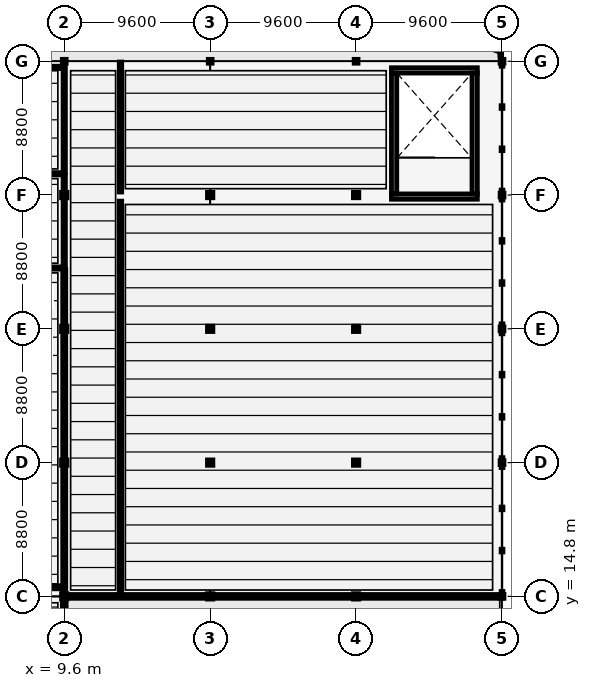
"""IFC4 building model, lengths in metres.
Left out: names, types, materials, properties, quantities, classifications, styles, units other than length and angle.
Written with IfcOpenShell. Run it as: python <this file> out.ifc"""

import sys

from ifc_helpers import new_model, si_unit, direction, frame, frame_2d, origin, origin_2d, place, context, subcontext, project, spatial, rectangle, hollow_rectangle, i_section, extrude, element, fill, save


model = new_model("IFC4")
c1 = context("Model", 3, precision=1e-05, world=origin(), true_north=direction((0.0, 1.0)))
c2 = subcontext(c1, "Body", "Model", "MODEL_VIEW")
j1 = project(units=[si_unit("LENGTHUNIT", "METRE"), si_unit("PLANEANGLEUNIT", "RADIAN")], contexts=[c1])
p1 = place(None, origin())
s1 = spatial("IfcSite", under=j1, at=p1, CompositionType="ELEMENT")
p2 = place(p1, origin())
s2 = spatial("IfcBuilding", under=s1, at=p2, CompositionType="ELEMENT")
p3 = place(p2, frame((0.0, 0.0, 9.6)))
s3 = spatial("IfcBuildingStorey", under=s2, at=p3, CompositionType="ELEMENT", Elevation=9.6)
p4 = place(p3, frame((9.6, 14.8, 0.0), z_axis=(0.0, 0.0, 1.0), x_axis=(1.0, 0.0, 0.0)))
e1 = element("IfcColumn", 1, at=p4, inside=s3, PredefinedType="COLUMN", context=c2, shape_type="SweptSolid", body=[
    extrude(i_section(OverallWidth=0.356, OverallDepth=0.356, WebThickness=0.011, FlangeThickness=0.018, FilletRadius=0.025, at=origin_2d()), origin(), (0.0, 0.0, 1.0), 5.629),
])
p5 = place(p3, frame((9.6, 23.6, 0.0), z_axis=(0.0, 0.0, 1.0), x_axis=(1.0, 0.0, 0.0)))
e2 = element("IfcColumn", 2, at=p5, inside=s3, PredefinedType="COLUMN", context=c2, shape_type="SweptSolid", body=[
    extrude(i_section(OverallWidth=0.356, OverallDepth=0.356, WebThickness=0.011, FlangeThickness=0.018, FilletRadius=0.025, at=origin_2d()), origin(), (0.0, 0.0, 1.0), 6.217),
])
p6 = place(p3, frame((9.6, 32.4, 0.0), z_axis=(0.0, 0.0, 1.0), x_axis=(1.0, 0.0, 0.0)))
e3 = element("IfcColumn", 3, at=p6, inside=s3, PredefinedType="COLUMN", context=c2, shape_type="SweptSolid", body=[
    extrude(i_section(OverallWidth=0.356, OverallDepth=0.356, WebThickness=0.011, FlangeThickness=0.018, FilletRadius=0.025, at=origin_2d()), origin(), (0.0, 0.0, 1.0), 6.224),
])
p7 = place(p3, frame((9.6, 41.2, 0.0), z_axis=(0.0, 0.0, 1.0), x_axis=(1.0, 0.0, 0.0)))
e4 = element("IfcColumn", 4, at=p7, inside=s3, PredefinedType="COLUMN", context=c2, shape_type="SweptSolid", body=[
    extrude(i_section(OverallWidth=0.356, OverallDepth=0.356, WebThickness=0.011, FlangeThickness=0.018, FilletRadius=0.025, at=origin_2d()), origin(), (0.0, 0.0, 1.0), 5.648),
])
p8 = place(p3, frame((9.6, 50.0, 0.0), z_axis=(0.0, 0.0, 1.0), x_axis=(1.0, 0.0, 0.0)))
e5 = element("IfcColumn", 5, at=p8, inside=s3, PredefinedType="COLUMN", context=c2, shape_type="SweptSolid", body=[
    extrude(hollow_rectangle(XDim=0.254, YDim=0.254, WallThickness=0.012, at=origin_2d()), origin(), (0.0, 0.0, 1.0), 4.648),
])
p9 = place(p3, frame((19.2, 14.8, 0.0), z_axis=(0.0, 0.0, 1.0), x_axis=(1.0, 0.0, 0.0)))
e6 = element("IfcColumn", 6, at=p9, inside=s3, PredefinedType="COLUMN", context=c2, shape_type="SweptSolid", body=[
    extrude(i_section(OverallWidth=0.356, OverallDepth=0.356, WebThickness=0.011, FlangeThickness=0.018, FilletRadius=0.025, at=origin_2d()), origin(), (0.0, 0.0, 1.0), 5.485),
])
p10 = place(p3, frame((19.2, 23.6, 0.0), z_axis=(0.0, 0.0, 1.0), x_axis=(1.0, 0.0, 0.0)))
e7 = element("IfcColumn", 7, at=p10, inside=s3, PredefinedType="COLUMN", context=c2, shape_type="SweptSolid", body=[
    extrude(i_section(OverallWidth=0.356, OverallDepth=0.356, WebThickness=0.011, FlangeThickness=0.018, FilletRadius=0.025, at=origin_2d()), origin(), (0.0, 0.0, 1.0), 6.22),
])
p11 = place(p3, frame((19.2, 32.4, 0.0), z_axis=(0.0, 0.0, 1.0), x_axis=(1.0, 0.0, 0.0)))
e8 = element("IfcColumn", 8, at=p11, inside=s3, PredefinedType="COLUMN", context=c2, shape_type="SweptSolid", body=[
    extrude(i_section(OverallWidth=0.356, OverallDepth=0.356, WebThickness=0.011, FlangeThickness=0.018, FilletRadius=0.025, at=origin_2d()), origin(), (0.0, 0.0, 1.0), 6.228),
])
p12 = place(p3, frame((19.2, 41.2, 0.0), z_axis=(0.0, 0.0, 1.0), x_axis=(1.0, 0.0, 0.0)))
e9 = element("IfcColumn", 9, at=p12, inside=s3, PredefinedType="COLUMN", context=c2, shape_type="SweptSolid", body=[
    extrude(i_section(OverallWidth=0.356, OverallDepth=0.356, WebThickness=0.011, FlangeThickness=0.018, FilletRadius=0.025, at=origin_2d()), origin(), (0.0, 0.0, 1.0), 5.509),
])
p13 = place(p3, frame((19.2, 50.0, 0.0), z_axis=(0.0, 0.0, 1.0), x_axis=(1.0, 0.0, 0.0)))
e10 = element("IfcColumn", 10, at=p13, inside=s3, PredefinedType="COLUMN", context=c2, shape_type="SweptSolid", body=[
    extrude(hollow_rectangle(XDim=0.254, YDim=0.254, WallThickness=0.012, at=origin_2d()), origin(), (0.0, 0.0, 1.0), 4.258),
])
p14 = place(p3, frame((28.8, 14.8, 0.0), z_axis=(0.0, 0.0, 1.0), x_axis=(1.0, 0.0, 0.0)))
e11 = element("IfcColumn", 11, at=p14, inside=s3, PredefinedType="COLUMN", context=c2, shape_type="SweptSolid", body=[
    extrude(i_section(OverallWidth=0.356, OverallDepth=0.356, WebThickness=0.011, FlangeThickness=0.018, FilletRadius=0.025, at=origin_2d()), origin(), (0.0, 0.0, 1.0), 4.573),
])
p15 = place(p3, frame((28.8, 23.6, 0.0), z_axis=(0.0, 0.0, 1.0), x_axis=(1.0, 0.0, 0.0)))
e12 = element("IfcColumn", 12, at=p15, inside=s3, PredefinedType="COLUMN", context=c2, shape_type="SweptSolid", body=[
    extrude(i_section(OverallWidth=0.356, OverallDepth=0.356, WebThickness=0.011, FlangeThickness=0.018, FilletRadius=0.025, at=origin_2d()), origin(), (0.0, 0.0, 1.0), 5.16),
])
p16 = place(p3, frame((28.8, 32.4, 0.0), z_axis=(0.0, 0.0, 1.0), x_axis=(1.0, 0.0, 0.0)))
e13 = element("IfcColumn", 13, at=p16, inside=s3, PredefinedType="COLUMN", context=c2, shape_type="SweptSolid", body=[
    extrude(i_section(OverallWidth=0.356, OverallDepth=0.356, WebThickness=0.011, FlangeThickness=0.018, FilletRadius=0.025, at=origin_2d()), origin(), (0.0, 0.0, 1.0), 5.167),
])
p17 = place(p3, frame((28.8, 41.2, 0.0), z_axis=(0.0, 0.0, 1.0), x_axis=(1.0, 0.0, 0.0)))
e14 = element("IfcColumn", 14, at=p17, inside=s3, PredefinedType="COLUMN", context=c2, shape_type="SweptSolid", body=[
    extrude(i_section(OverallWidth=0.356, OverallDepth=0.356, WebThickness=0.011, FlangeThickness=0.018, FilletRadius=0.025, at=origin_2d()), origin(), (0.0, 0.0, 1.0), 4.592),
])
p18 = place(p3, frame((28.8, 50.0, 0.0), z_axis=(0.0, 0.0, 1.0), x_axis=(1.0, 0.0, 0.0)))
e15 = element("IfcColumn", 15, at=p18, inside=s3, PredefinedType="COLUMN", context=c2, shape_type="SweptSolid", body=[
    extrude(hollow_rectangle(XDim=0.254, YDim=0.254, WallThickness=0.012, at=origin_2d()), origin(), (0.0, 0.0, 1.0), 3.592),
])
p19 = place(p3, frame((38.4, 14.8, 0.0), z_axis=(0.0, 0.0, 1.0), x_axis=(1.0, 0.0, 0.0)))
e16 = element("IfcColumn", 16, at=p19, inside=s3, PredefinedType="COLUMN", context=c2, shape_type="SweptSolid", body=[
    extrude(hollow_rectangle(XDim=0.254, YDim=0.254, WallThickness=0.012, at=origin_2d()), origin(), (0.0, 0.0, 1.0), 3.809),
])
p20 = place(p3, frame((38.4, 23.6, 0.0), z_axis=(0.0, 0.0, 1.0), x_axis=(1.0, 0.0, 0.0)))
e17 = element("IfcColumn", 17, at=p20, inside=s3, PredefinedType="COLUMN", context=c2, shape_type="SweptSolid", body=[
    extrude(hollow_rectangle(XDim=0.254, YDim=0.254, WallThickness=0.012, at=origin_2d()), origin(), (0.0, 0.0, 1.0), 4.013),
])
p21 = place(p3, frame((38.4, 32.4, 0.0), z_axis=(0.0, 0.0, 1.0), x_axis=(1.0, 0.0, 0.0)))
e18 = element("IfcColumn", 18, at=p21, inside=s3, PredefinedType="COLUMN", context=c2, shape_type="SweptSolid", body=[
    extrude(hollow_rectangle(XDim=0.254, YDim=0.254, WallThickness=0.012, at=origin_2d()), origin(), (0.0, 0.0, 1.0), 4.016),
])
p22 = place(p3, frame((38.4, 41.2, 0.0), z_axis=(0.0, 0.0, 1.0), x_axis=(1.0, 0.0, 0.0)))
e19 = element("IfcColumn", 19, at=p22, inside=s3, PredefinedType="COLUMN", context=c2, shape_type="SweptSolid", body=[
    extrude(hollow_rectangle(XDim=0.254, YDim=0.254, WallThickness=0.012, at=origin_2d()), origin(), (0.0, 0.0, 1.0), 3.815),
])
p23 = place(p3, frame((38.4, 50.0, 0.0), z_axis=(0.0, 0.0, 1.0), x_axis=(1.0, 0.0, 0.0)))
e20 = element("IfcColumn", 20, at=p23, inside=s3, PredefinedType="COLUMN", context=c2, shape_type="SweptSolid", body=[
    extrude(hollow_rectangle(XDim=0.254, YDim=0.254, WallThickness=0.012, at=origin_2d()), origin(), (0.0, 0.0, 1.0), 3.467),
])
p24 = place(p3, frame((9.6, 14.8, 0.0), z_axis=(0.0, 0.0, 1.0), x_axis=(1.0, 0.0, 0.0)))
e21 = element("IfcWall", 21, at=p24, inside=s3, PredefinedType="STANDARD", context=c2, shape_type="SweptSolid", body=[
    extrude(rectangle(XDim=9.6, YDim=0.25, at=frame_2d((4.8, 0.0))), origin(), (0.0, 0.0, 1.0), 3.5),
])
p25 = place(p24, frame((3.6, 0.0, 0.0)))
e22 = element("IfcOpeningElement", 22, at=p25, cuts=e21, PredefinedType="OPENING", context=c2, shape_type="SweptSolid", body=[
    extrude(rectangle(XDim=1.48, YDim=2.11, at=frame_2d((0.74, 1.055))), frame((0.0, 0.135, 0.0), z_axis=(0.0, -1.0, 0.0), x_axis=(1.0, 0.0, 0.0)), (0.0, 0.0, 1.0), 0.27),
])
p26 = place(p24, frame((1.1, 0.0, 0.85)))
e23 = element("IfcOpeningElement", 23, at=p26, cuts=e21, PredefinedType="OPENING", context=c2, shape_type="SweptSolid", body=[
    extrude(rectangle(XDim=1.68, YDim=1.71, at=frame_2d((0.84, 0.855))), frame((0.0, 0.135, 0.0), z_axis=(0.0, -1.0, 0.0), x_axis=(1.0, 0.0, 0.0)), (0.0, 0.0, 1.0), 0.27),
])
p27 = place(p3, frame((19.2, 14.8, 0.0), z_axis=(0.0, 0.0, 1.0), x_axis=(1.0, 0.0, 0.0)))
e24 = element("IfcWall", 24, at=p27, inside=s3, PredefinedType="STANDARD", context=c2, shape_type="SweptSolid", body=[
    extrude(rectangle(XDim=9.6, YDim=0.25, at=frame_2d((4.8, 0.0))), origin(), (0.0, 0.0, 1.0), 3.5),
])
p28 = place(p27, frame((3.6, 0.0, 0.0)))
e25 = element("IfcOpeningElement", 25, at=p28, cuts=e24, PredefinedType="OPENING", context=c2, shape_type="SweptSolid", body=[
    extrude(rectangle(XDim=1.6, YDim=2.2, at=frame_2d((0.8, 1.1))), frame((0.0, 0.135, 0.0), z_axis=(0.0, -1.0, 0.0), x_axis=(1.0, 0.0, 0.0)), (0.0, 0.0, 1.0), 0.27),
])
p29 = place(p27, frame((1.1, 0.0, 0.85)))
e26 = element("IfcOpeningElement", 26, at=p29, cuts=e24, PredefinedType="OPENING", context=c2, shape_type="SweptSolid", body=[
    extrude(rectangle(XDim=1.76, YDim=1.77, at=frame_2d((0.88, 0.885))), frame((0.0, 0.135, 0.0), z_axis=(0.0, -1.0, 0.0), x_axis=(1.0, 0.0, 0.0)), (0.0, 0.0, 1.0), 0.27),
])
p30 = place(p3, frame((28.8, 14.8, 0.0), z_axis=(0.0, 0.0, 1.0), x_axis=(1.0, 0.0, 0.0)))
e27 = element("IfcWall", 27, at=p30, inside=s3, PredefinedType="STANDARD", context=c2, shape_type="SweptSolid", body=[
    extrude(rectangle(XDim=9.6, YDim=0.25, at=frame_2d((4.8, 0.0))), origin(), (0.0, 0.0, 1.0), 3.5),
])
p31 = place(p30, frame((3.6, 0.0, 0.0)))
e28 = element("IfcOpeningElement", 28, at=p31, cuts=e27, PredefinedType="OPENING", context=c2, shape_type="SweptSolid", body=[
    extrude(rectangle(XDim=1.48, YDim=2.11, at=frame_2d((0.74, 1.055))), frame((0.0, 0.135, 0.0), z_axis=(0.0, -1.0, 0.0), x_axis=(1.0, 0.0, 0.0)), (0.0, 0.0, 1.0), 0.27),
])
p32 = place(p30, frame((1.1, 0.0, 0.85)))
e29 = element("IfcOpeningElement", 29, at=p32, cuts=e27, PredefinedType="OPENING", context=c2, shape_type="SweptSolid", body=[
    extrude(rectangle(XDim=1.72, YDim=1.74, at=frame_2d((0.86, 0.87))), frame((0.0, 0.135, 0.0), z_axis=(0.0, -1.0, 0.0), x_axis=(1.0, 0.0, 0.0)), (0.0, 0.0, 1.0), 0.27),
])
p33 = place(p3, frame((9.6, 6.127, 0.0), z_axis=(0.0, 0.0, 1.0), x_axis=(0.0, 1.0, 0.0)))
e30 = element("IfcWall", 30, at=p33, inside=s3, PredefinedType="STANDARD", context=c2, shape_type="SweptSolid", body=[
    extrude(rectangle(XDim=8.495, YDim=0.25, at=frame_2d((4.248, 0.0))), origin(), (0.0, 0.0, 1.0), 3.5),
])
p34 = place(p33, frame((3.4, 0.0, 0.0)))
e31 = element("IfcOpeningElement", 31, at=p34, cuts=e30, PredefinedType="OPENING", context=c2, shape_type="SweptSolid", body=[
    extrude(rectangle(XDim=1.0, YDim=2.2, at=frame_2d((0.5, 1.1))), frame((0.0, 0.135, 0.0), z_axis=(0.0, -1.0, 0.0), x_axis=(1.0, 0.0, 0.0)), (0.0, 0.0, 1.0), 0.27),
])
for number, where, z_axis, x_axis in (
    (32, (36.775, 41.1, 0.0), (0.0, 0.0, 1.0), (-1.0, 0.0, 0.0)),
    (33, (31.125, 49.4, 0.0), (0.0, 0.0, 1.0), (1.0, 0.0, 0.0)),
):
    element("IfcWall", number, at=place(p3, frame(where, z_axis=z_axis, x_axis=x_axis)), inside=s3, PredefinedType="SHEAR", context=c2, shape_type="SweptSolid", body=[
        extrude(rectangle(XDim=5.65, YDim=0.35, at=frame_2d((2.825, 0.0))), origin(), (0.0, 0.0, 1.0), 3.85),
    ])
p35 = place(p3, frame((31.3, 41.275, 0.0), z_axis=(0.0, 0.0, 1.0), x_axis=(0.0, 1.0, 0.0)))
e34 = element("IfcWall", 34, at=p35, inside=s3, PredefinedType="SHEAR", context=c2, shape_type="SweptSolid", body=[
    extrude(rectangle(XDim=7.95, YDim=0.35, at=frame_2d((3.975, 0.0))), origin(), (0.0, 0.0, 1.0), 3.85),
])
p36 = place(p35, frame((0.22, 0.0, 0.0)))
e35 = element("IfcOpeningElement", 35, at=p36, cuts=e34, PredefinedType="OPENING", context=c2, shape_type="SweptSolid", body=[
    extrude(rectangle(XDim=2.05, YDim=2.15, at=frame_2d((1.025, 1.075))), frame((0.0, 0.185, 0.0), z_axis=(0.0, -1.0, 0.0), x_axis=(1.0, 0.0, 0.0)), (0.0, 0.0, 1.0), 0.37),
])
p37 = place(p3, frame((36.6, 49.225, 0.0), z_axis=(0.0, 0.0, 1.0), x_axis=(0.0, -1.0, 0.0)))
e36 = element("IfcWall", 36, at=p37, inside=s3, PredefinedType="SHEAR", context=c2, shape_type="SweptSolid", body=[
    extrude(rectangle(XDim=7.95, YDim=0.35, at=frame_2d((3.975, 0.0))), origin(), (0.0, 0.0, 1.0), 3.85),
])
p38 = place(p3, frame((13.3, 14.85, 0.0), z_axis=(0.0, 0.0, 1.0), x_axis=(0.0, 1.0, 0.0)))
e37 = element("IfcWall", 37, at=p38, inside=s3, PredefinedType="PARTITIONING", context=c2, shape_type="SweptSolid", body=[
    extrude(rectangle(XDim=25.95, YDim=0.16, at=frame_2d((12.975, 0.0))), origin(), (0.0, 0.0, 1.0), 3.4),
])
p39 = place(p38, frame((12.075, 0.0, 0.0)))
e38 = element("IfcOpeningElement", 38, at=p39, cuts=e37, PredefinedType="OPENING", context=c2, shape_type="SweptSolid", body=[
    extrude(rectangle(XDim=1.8, YDim=2.15, at=frame_2d((0.9, 1.075))), frame((0.0, 0.09, 0.0), z_axis=(0.0, -1.0, 0.0), x_axis=(1.0, 0.0, 0.0)), (0.0, 0.0, 1.0), 0.18),
])
p40 = place(p3, frame((13.3, 41.4, 0.0), z_axis=(0.0, 0.0, 1.0), x_axis=(0.0, 1.0, 0.0)))
e39 = element("IfcWall", 39, at=p40, inside=s3, PredefinedType="PARTITIONING", context=c2, shape_type="SweptSolid", body=[
    extrude(rectangle(XDim=8.55, YDim=0.16, at=frame_2d((4.275, 0.0))), origin(), (0.0, 0.0, 1.0), 3.4),
])
p41 = place(p40, frame((3.375, 0.0, 0.0)))
e40 = element("IfcOpeningElement", 40, at=p41, cuts=e39, PredefinedType="OPENING", context=c2, shape_type="SweptSolid", body=[
    extrude(rectangle(XDim=1.8, YDim=2.15, at=frame_2d((0.9, 1.075))), frame((0.0, 0.09, 0.0), z_axis=(0.0, -1.0, 0.0), x_axis=(1.0, 0.0, 0.0)), (0.0, 0.0, 1.0), 0.18),
])
p42 = place(p3, frame((9.6, 14.85, 0.0), z_axis=(0.0, 0.0, 1.0), x_axis=(0.0, 1.0, 0.0)))
e41 = element("IfcWall", 41, at=p42, inside=s3, PredefinedType="PARTITIONING", context=c2, shape_type="SweptSolid", body=[
    extrude(rectangle(XDim=21.45, YDim=0.2, at=frame_2d((10.725, 0.0))), origin(), (0.0, 0.0, 1.0), 3.4),
])
p43 = place(p42, frame((9.925, 0.0, 0.0)))
e42 = element("IfcOpeningElement", 42, at=p43, cuts=e41, PredefinedType="OPENING", context=c2, shape_type="SweptSolid", body=[
    extrude(rectangle(XDim=1.6, YDim=2.15, at=frame_2d((0.8, 1.075))), frame((0.0, 0.11, 0.0), z_axis=(0.0, -1.0, 0.0), x_axis=(1.0, 0.0, 0.0)), (0.0, 0.0, 1.0), 0.22),
])
p44 = place(p3, frame((9.6, 36.5, 0.0), z_axis=(0.0, 0.0, 1.0), x_axis=(0.0, 1.0, 0.0)))
e43 = element("IfcWall", 43, at=p44, inside=s3, PredefinedType="PARTITIONING", context=c2, shape_type="SweptSolid", body=[
    extrude(rectangle(XDim=6.0, YDim=0.15, at=frame_2d((3.0, 0.0))), origin(), (0.0, 0.0, 1.0), 3.4),
])
p45 = place(p44, frame((2.55, 0.0, 0.0)))
e44 = element("IfcOpeningElement", 44, at=p45, cuts=e43, PredefinedType="OPENING", context=c2, shape_type="SweptSolid", body=[
    extrude(rectangle(XDim=0.9, YDim=2.15, at=frame_2d((0.45, 1.075))), frame((0.0, 0.085, 0.0), z_axis=(0.0, -1.0, 0.0), x_axis=(1.0, 0.0, 0.0)), (0.0, 0.0, 1.0), 0.17),
])
p46 = place(p3, frame((9.6, 42.7, 0.0), z_axis=(0.0, 0.0, 1.0), x_axis=(0.0, 1.0, 0.0)))
e45 = element("IfcWall", 45, at=p46, inside=s3, PredefinedType="PARTITIONING", context=c2, shape_type="SweptSolid", body=[
    extrude(rectangle(XDim=7.25, YDim=0.15, at=frame_2d((3.625, 0.0))), origin(), (0.0, 0.0, 1.0), 3.4),
])
p47 = place(p46, frame((3.15, 0.0, 0.0)))
e46 = element("IfcOpeningElement", 46, at=p47, cuts=e45, PredefinedType="OPENING", context=c2, shape_type="SweptSolid", body=[
    extrude(rectangle(XDim=0.95, YDim=2.15, at=frame_2d((0.475, 1.075))), frame((0.0, 0.085, 0.0), z_axis=(0.0, -1.0, 0.0), x_axis=(1.0, 0.0, 0.0)), (0.0, 0.0, 1.0), 0.17),
])
p48 = place(p3, frame((5.0, 36.4, 0.0), z_axis=(0.0, 0.0, 1.0), x_axis=(1.0, 0.0, 0.0)))
e47 = element("IfcWall", 47, at=p48, inside=s3, PredefinedType="PARTITIONING", context=c2, shape_type="SweptSolid", body=[
    extrude(rectangle(XDim=4.4, YDim=0.15, at=frame_2d((2.2, 0.0))), origin(), (0.0, 0.0, 1.0), 3.4),
])
p49 = place(p3, frame((5.8, 42.6, 0.0), z_axis=(0.0, 0.0, 1.0), x_axis=(1.0, 0.0, 0.0)))
e48 = element("IfcWall", 48, at=p49, inside=s3, PredefinedType="PARTITIONING", context=c2, shape_type="SweptSolid", body=[
    extrude(rectangle(XDim=3.6, YDim=0.15, at=frame_2d((1.8, 0.0))), origin(), (0.0, 0.0, 1.0), 3.4),
])
p50 = place(p3, frame((0.05, 15.4, 0.0), z_axis=(0.0, 0.0, 1.0), x_axis=(1.0, 0.0, 0.0)))
e49 = element("IfcWall", 49, at=p50, inside=s3, PredefinedType="PARTITIONING", context=c2, shape_type="SweptSolid", body=[
    extrude(rectangle(XDim=9.21, YDim=0.2, at=frame_2d((4.605, 0.0))), origin(), (0.0, 0.0, 1.0), 3.4),
])
p51 = place(p3, frame((5.94, 49.6, 0.0), z_axis=(0.0, 0.0, 1.0), x_axis=(1.0, 0.0, 0.0)))
e50 = element("IfcWall", 50, at=p51, inside=s3, PredefinedType="PARTITIONING", context=c2, shape_type="SweptSolid", body=[
    extrude(rectangle(XDim=3.32, YDim=0.15, at=frame_2d((1.66, 0.0))), origin(), (0.0, 0.0, 1.0), 3.4),
])
p52 = place(p25, origin())
e51 = element("IfcDoor", 51, at=p52, inside=s3, OperationType="DOUBLE_DOOR_SINGLE_SWING", PredefinedType="DOOR", context=c2, shape_type="SweptSolid", body=[
    extrude(rectangle(XDim=1.48, YDim=2.11, at=frame_2d((0.74, 1.055))), frame((0.0, 0.025, 0.0), z_axis=(0.0, -1.0, 0.0), x_axis=(1.0, 0.0, 0.0)), (0.0, 0.0, 1.0), 0.05),
])
fill(e22, e51)
p53 = place(p26, origin())
e52 = element("IfcWindow", 52, at=p53, inside=s3, PartitioningType="SINGLE_PANEL", PredefinedType="WINDOW", context=c2, shape_type="SweptSolid", body=[
    extrude(rectangle(XDim=1.68, YDim=1.71, at=frame_2d((0.84, 0.855))), frame((0.0, 0.03, 0.0), z_axis=(0.0, -1.0, 0.0), x_axis=(1.0, 0.0, 0.0)), (0.0, 0.0, 1.0), 0.06),
])
fill(e23, e52)
p54 = place(p28, origin())
e53 = element("IfcDoor", 53, at=p54, inside=s3, OperationType="DOUBLE_DOOR_SINGLE_SWING", PredefinedType="DOOR", context=c2, shape_type="SweptSolid", body=[
    extrude(rectangle(XDim=1.6, YDim=2.2, at=frame_2d((0.8, 1.1))), frame((0.0, 0.025, 0.0), z_axis=(0.0, -1.0, 0.0), x_axis=(1.0, 0.0, 0.0)), (0.0, 0.0, 1.0), 0.05),
])
fill(e25, e53)
p55 = place(p29, origin())
e54 = element("IfcWindow", 54, at=p55, inside=s3, PartitioningType="SINGLE_PANEL", PredefinedType="WINDOW", context=c2, shape_type="SweptSolid", body=[
    extrude(rectangle(XDim=1.76, YDim=1.77, at=frame_2d((0.88, 0.885))), frame((0.0, 0.03, 0.0), z_axis=(0.0, -1.0, 0.0), x_axis=(1.0, 0.0, 0.0)), (0.0, 0.0, 1.0), 0.06),
])
fill(e26, e54)
p56 = place(p31, origin())
e55 = element("IfcDoor", 55, at=p56, inside=s3, OperationType="DOUBLE_DOOR_SINGLE_SWING", PredefinedType="DOOR", context=c2, shape_type="SweptSolid", body=[
    extrude(rectangle(XDim=1.48, YDim=2.11, at=frame_2d((0.74, 1.055))), frame((0.0, 0.025, 0.0), z_axis=(0.0, -1.0, 0.0), x_axis=(1.0, 0.0, 0.0)), (0.0, 0.0, 1.0), 0.05),
])
fill(e28, e55)
p57 = place(p32, origin())
e56 = element("IfcWindow", 56, at=p57, inside=s3, PartitioningType="SINGLE_PANEL", PredefinedType="WINDOW", context=c2, shape_type="SweptSolid", body=[
    extrude(rectangle(XDim=1.72, YDim=1.74, at=frame_2d((0.86, 0.87))), frame((0.0, 0.03, 0.0), z_axis=(0.0, -1.0, 0.0), x_axis=(1.0, 0.0, 0.0)), (0.0, 0.0, 1.0), 0.06),
])
fill(e29, e56)
p58 = place(p36, origin())
e57 = element("IfcDoor", 57, at=p58, inside=s3, OperationType="DOUBLE_DOOR_SINGLE_SWING", PredefinedType="DOOR", context=c2, shape_type="SweptSolid", body=[
    extrude(rectangle(XDim=2.05, YDim=2.15, at=frame_2d((1.025, 1.075))), frame((0.0, 0.025, 0.0), z_axis=(0.0, -1.0, 0.0), x_axis=(1.0, 0.0, 0.0)), (0.0, 0.0, 1.0), 0.05),
])
fill(e35, e57)
p59 = place(p39, origin())
e58 = element("IfcDoor", 58, at=p59, inside=s3, OperationType="DOUBLE_DOOR_SINGLE_SWING", PredefinedType="DOOR", context=c2, shape_type="SweptSolid", body=[
    extrude(rectangle(XDim=1.8, YDim=2.15, at=frame_2d((0.9, 1.075))), frame((0.0, 0.025, 0.0), z_axis=(0.0, -1.0, 0.0), x_axis=(1.0, 0.0, 0.0)), (0.0, 0.0, 1.0), 0.05),
])
fill(e38, e58)
p60 = place(p41, origin())
e59 = element("IfcDoor", 59, at=p60, inside=s3, OperationType="DOUBLE_DOOR_SINGLE_SWING", PredefinedType="DOOR", context=c2, shape_type="SweptSolid", body=[
    extrude(rectangle(XDim=1.8, YDim=2.15, at=frame_2d((0.9, 1.075))), frame((0.0, 0.025, 0.0), z_axis=(0.0, -1.0, 0.0), x_axis=(1.0, 0.0, 0.0)), (0.0, 0.0, 1.0), 0.05),
])
fill(e40, e59)
p61 = place(p43, origin())
e60 = element("IfcDoor", 60, at=p61, inside=s3, OperationType="DOUBLE_DOOR_SINGLE_SWING", PredefinedType="DOOR", context=c2, shape_type="SweptSolid", body=[
    extrude(rectangle(XDim=1.6, YDim=2.15, at=frame_2d((0.8, 1.075))), frame((0.0, 0.025, 0.0), z_axis=(0.0, -1.0, 0.0), x_axis=(1.0, 0.0, 0.0)), (0.0, 0.0, 1.0), 0.05),
])
fill(e42, e60)
p62 = place(p45, origin())
e61 = element("IfcDoor", 61, at=p62, inside=s3, OperationType="SINGLE_SWING_LEFT", PredefinedType="DOOR", context=c2, shape_type="SweptSolid", body=[
    extrude(rectangle(XDim=0.9, YDim=2.15, at=frame_2d((0.45, 1.075))), frame((0.0, 0.025, 0.0), z_axis=(0.0, -1.0, 0.0), x_axis=(1.0, 0.0, 0.0)), (0.0, 0.0, 1.0), 0.05),
])
fill(e44, e61)
p63 = place(p47, origin())
e62 = element("IfcDoor", 62, at=p63, inside=s3, OperationType="SINGLE_SWING_RIGHT", PredefinedType="DOOR", context=c2, shape_type="SweptSolid", body=[
    extrude(rectangle(XDim=0.95, YDim=2.15, at=frame_2d((0.475, 1.075))), frame((0.0, 0.025, 0.0), z_axis=(0.0, -1.0, 0.0), x_axis=(1.0, 0.0, 0.0)), (0.0, 0.0, 1.0), 0.05),
])
fill(e46, e62)
save(model, sys.argv[1])
